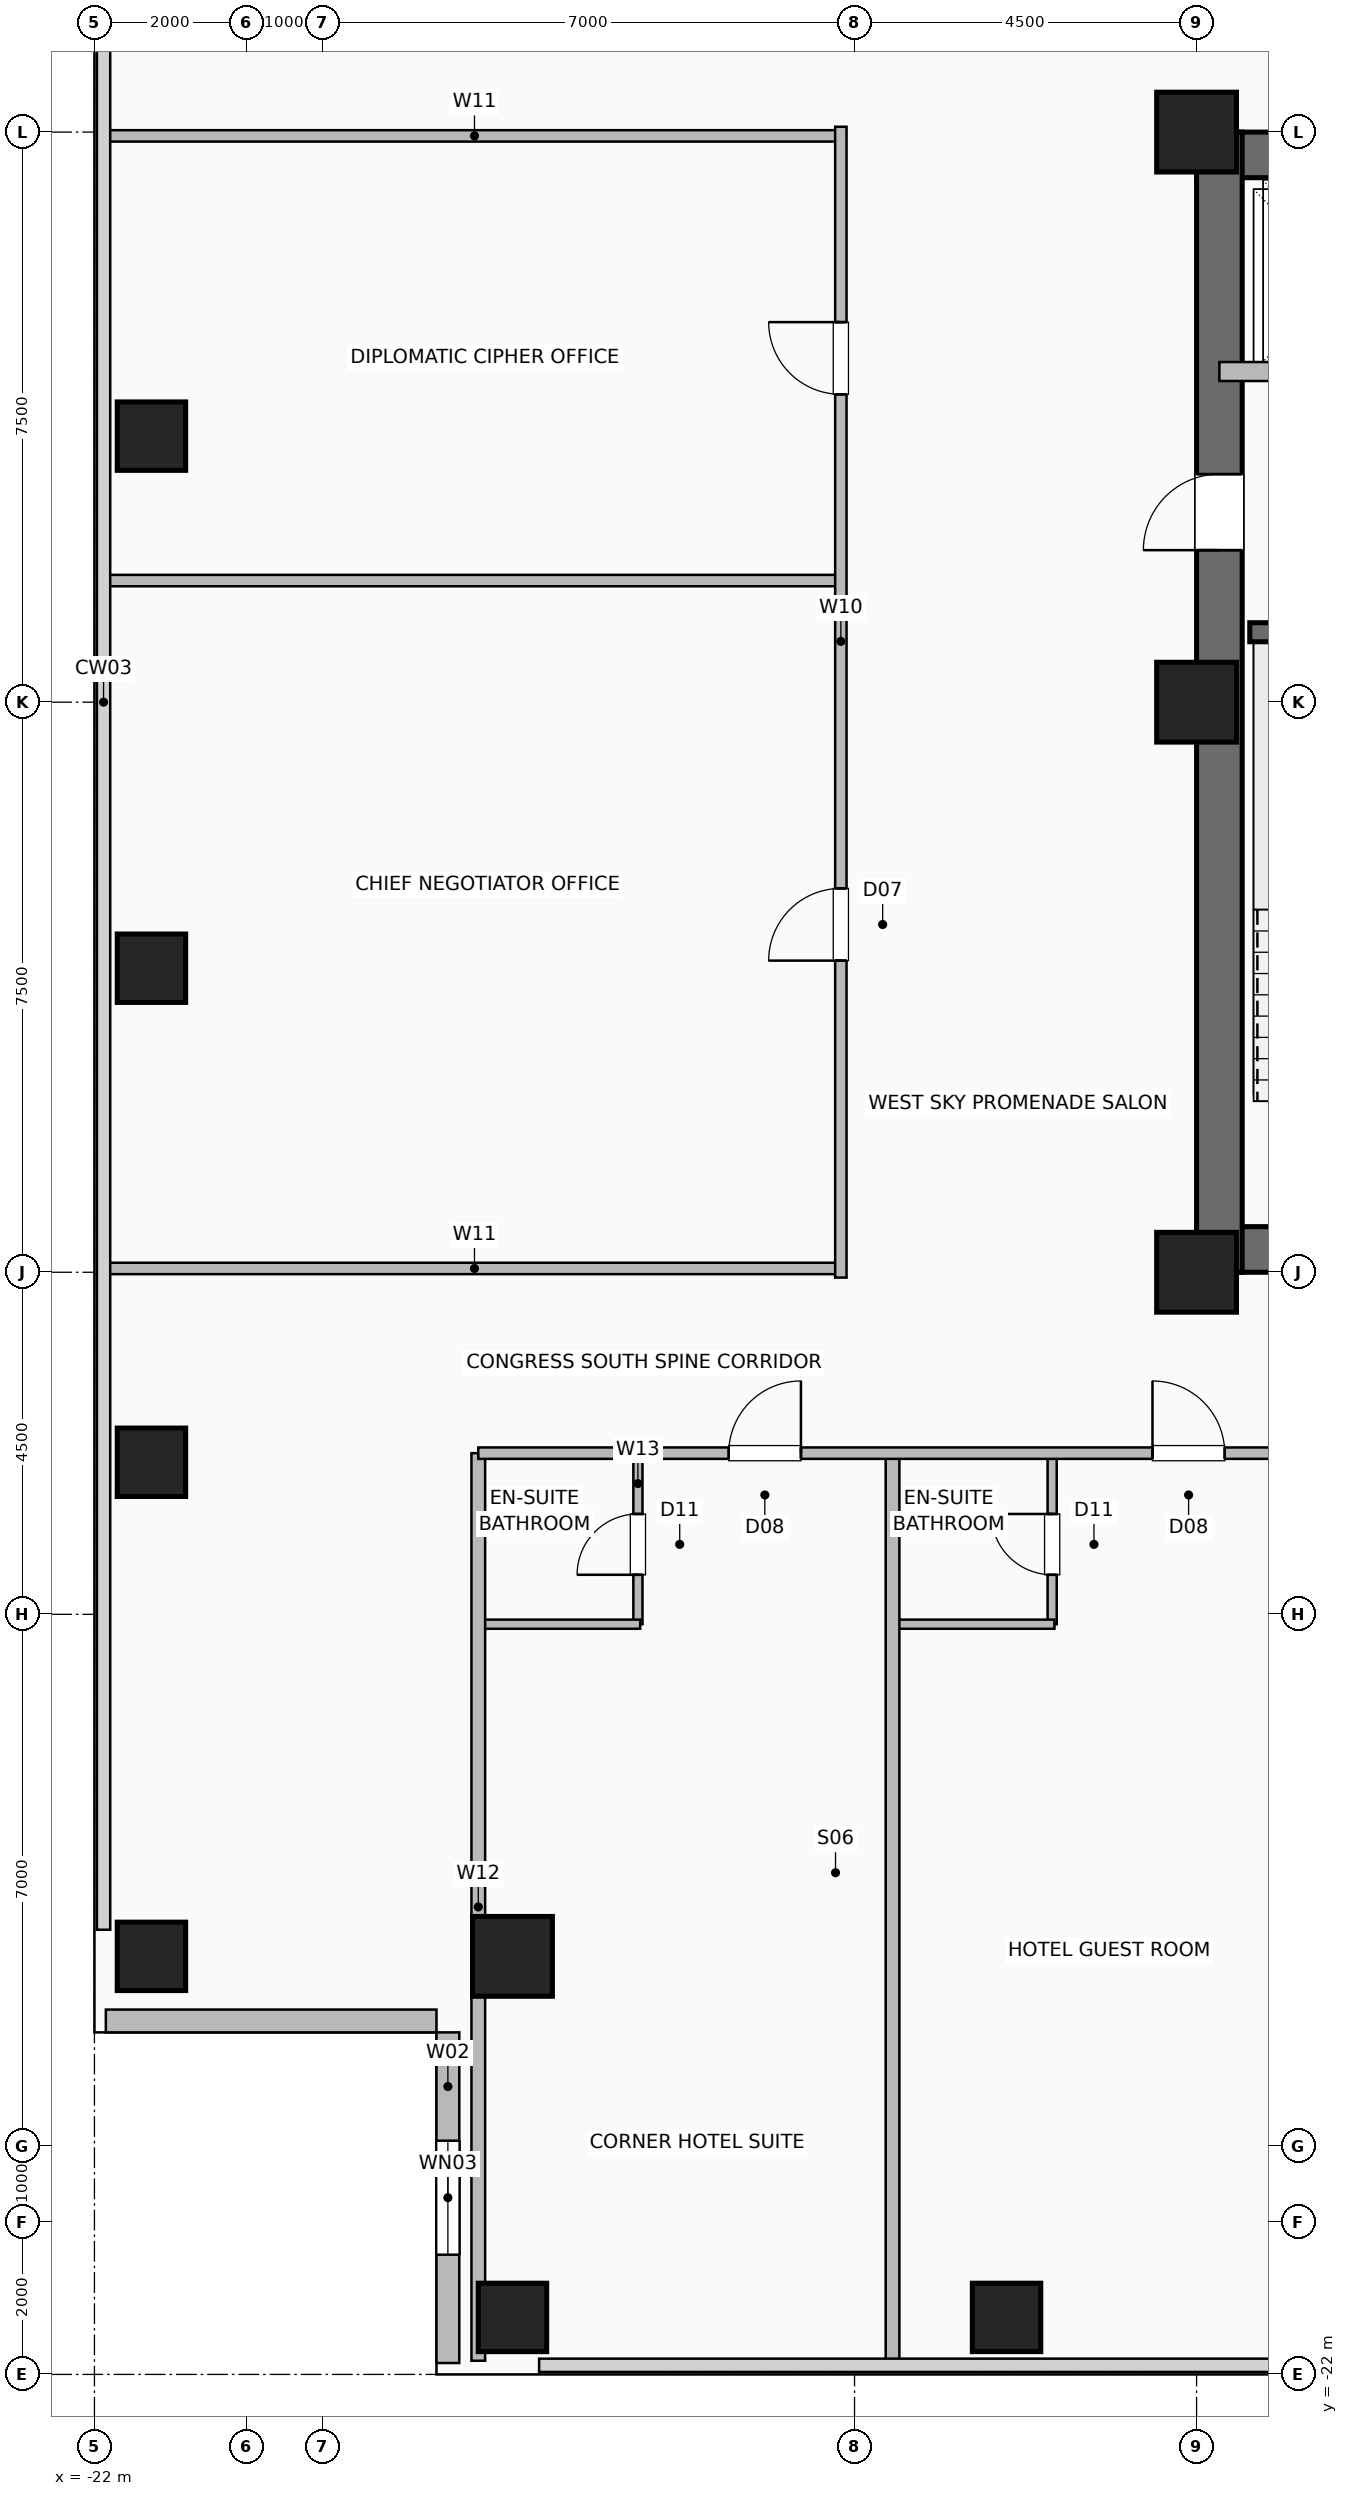
"""IFC4 building model, lengths in metres.
Left out: names, types, materials, properties, quantities, classifications, styles, units other than length and angle.
Written with IfcOpenShell. Run it as: python <this file> out.ifc"""

import sys

from ifc_helpers import new_model, si_unit, direction, frame, frame_2d, origin, origin_2d, place, context, subcontext, project, spatial, rectangle, hollow_rectangle, extrude, element, fill, save


model = new_model("IFC4")
c1 = context("Model", 3, precision=1e-05, world=origin(), true_north=direction((0.0, 1.0)))
c2 = subcontext(c1, "Body", "Model", "MODEL_VIEW")
j1 = project(units=[si_unit("LENGTHUNIT", "METRE"), si_unit("PLANEANGLEUNIT", "RADIAN")], contexts=[c1])
p1 = place(None, origin())
s1 = spatial("IfcSite", under=j1, at=p1, CompositionType="ELEMENT")
p2 = place(p1, origin())
s2 = spatial("IfcBuilding", under=s1, at=p2, CompositionType="ELEMENT")
p3 = place(p2, frame((0.0, 0.0, 151.6)))
s3 = spatial("IfcBuildingStorey", under=s2, at=p3, CompositionType="ELEMENT", Elevation=151.6)
for number, where, z_axis, x_axis in (
    (1, (-7.5, -7.5, 0.0), (0.0, 0.0, 1.0), (1.0, 0.0, 0.0)),
    (2, (-7.5, 7.5, 0.0), (0.0, 0.0, 1.0), (1.0, 0.0, 0.0)),
    (3, (-7.5, 0.0, 0.0), (0.0, 0.0, 1.0), (1.0, 0.0, 0.0)),
):
    element("IfcColumn", number, at=place(p3, frame(where, z_axis=z_axis, x_axis=x_axis)), inside=s3, PredefinedType="COLUMN", context=c2, shape_type="SweptSolid", body=[
        extrude(hollow_rectangle(XDim=1.05, YDim=1.05, WallThickness=0.05, at=origin_2d()), origin(), (0.0, 0.0, 1.0), 3.6),
    ])
for number, where, z_axis, x_axis in (
    (4, (-16.5, -21.25, 0.0), (0.0, 0.0, 1.0), (1.0, 0.0, 0.0)),
    (5, (-21.25, -16.5, 0.0), (0.0, 0.0, 1.0), (1.0, 0.0, 0.0)),
    (6, (-10.0, -21.25, 0.0), (0.0, 0.0, 1.0), (1.0, 0.0, 0.0)),
    (7, (-21.25, -10.0, 0.0), (0.0, 0.0, 1.0), (1.0, 0.0, 0.0)),
    (8, (-21.25, -3.5, 0.0), (0.0, 0.0, 1.0), (1.0, 0.0, 0.0)),
    (9, (-21.25, 3.5, 0.0), (0.0, 0.0, 1.0), (1.0, 0.0, 0.0)),
):
    element("IfcColumn", number, at=place(p3, frame(where, z_axis=z_axis, x_axis=x_axis)), inside=s3, PredefinedType="COLUMN", context=c2, shape_type="SweptSolid", body=[
        extrude(hollow_rectangle(XDim=0.9, YDim=0.9, WallThickness=0.045, at=origin_2d()), origin(), (0.0, 0.0, 1.0), 3.6),
    ])
p4 = place(p3, frame((-16.5, -16.5, 0.0), z_axis=(0.0, 0.0, 1.0), x_axis=(1.0, 0.0, 0.0)))
e10 = element("IfcColumn", 10, at=p4, inside=s3, PredefinedType="COLUMN", context=c2, shape_type="SweptSolid", body=[
    extrude(hollow_rectangle(XDim=1.05, YDim=1.05, WallThickness=0.05, at=origin_2d()), origin(), (0.0, 0.0, 1.0), 3.6),
])
p5 = place(p3, frame((-17.35, -21.85, 0.0), z_axis=(0.0, 0.0, 1.0), x_axis=(0.0, 1.0, 0.0)))
e11 = element("IfcWall", 11, at=p5, inside=s3, PredefinedType="SOLIDWALL", context=c2, shape_type="SweptSolid", body=[
    extrude(rectangle(XDim=4.35, YDim=0.3, at=frame_2d((2.175, 0.0))), origin(), (0.0, 0.0, 1.0), 3.25),
])
p6 = place(p5, frame((1.425, 0.0, 0.9)))
e12 = element("IfcOpeningElement", 12, at=p6, cuts=e11, PredefinedType="OPENING", context=c2, shape_type="SweptSolid", body=[
    extrude(rectangle(XDim=1.5, YDim=1.8, at=frame_2d((0.75, 0.9))), frame((0.0, 0.16, 0.0), z_axis=(0.0, -1.0, 0.0), x_axis=(1.0, 0.0, 0.0)), (0.0, 0.0, 1.0), 0.32),
])
p7 = place(p3, frame((-21.85, -17.35, 0.0), z_axis=(0.0, 0.0, 1.0), x_axis=(1.0, 0.0, 0.0)))
e13 = element("IfcWall", 13, at=p7, inside=s3, PredefinedType="SOLIDWALL", context=c2, shape_type="SweptSolid", body=[
    extrude(rectangle(XDim=4.35, YDim=0.3, at=frame_2d((2.175, 0.0))), origin(), (0.0, 0.0, 1.0), 3.25),
])
p8 = place(p3, frame((-7.5, -7.2, 0.0), z_axis=(0.0, 0.0, 1.0), x_axis=(1.0, 0.0, 0.0)))
e14 = element("IfcWall", 14, at=p8, inside=s3, PredefinedType="SHEAR", context=c2, shape_type="SweptSolid", body=[
    extrude(rectangle(XDim=15.0, YDim=0.6, at=frame_2d((7.5, 0.0))), origin(), (0.0, 0.0, 1.0), 3.25),
])
p9 = place(p8, frame((1.55, 0.0, 0.0)))
e15 = element("IfcOpeningElement", 15, at=p9, cuts=e14, PredefinedType="OPENING", context=c2, shape_type="SweptSolid", body=[
    extrude(rectangle(XDim=1.05, YDim=2.08, at=frame_2d((0.525, 1.04))), frame((0.0, 0.31, 0.0), z_axis=(0.0, -1.0, 0.0), x_axis=(1.0, 0.0, 0.0)), (0.0, 0.0, 1.0), 0.62),
])
p10 = place(p8, frame((12.4, 0.0, 0.0)))
e16 = element("IfcOpeningElement", 16, at=p10, cuts=e14, PredefinedType="OPENING", context=c2, shape_type="SweptSolid", body=[
    extrude(rectangle(XDim=1.05, YDim=2.08, at=frame_2d((0.525, 1.04))), frame((0.0, 0.31, 0.0), z_axis=(0.0, -1.0, 0.0), x_axis=(1.0, 0.0, 0.0)), (0.0, 0.0, 1.0), 0.62),
])
p11 = place(p8, frame((5.2, 0.0, 0.0)))
e17 = element("IfcOpeningElement", 17, at=p11, cuts=e14, PredefinedType="OPENING", context=c2, shape_type="SweptSolid", body=[
    extrude(rectangle(XDim=1.0, YDim=2.08, at=frame_2d((0.5, 1.04))), frame((0.0, 0.31, 0.0), z_axis=(0.0, -1.0, 0.0), x_axis=(1.0, 0.0, 0.0)), (0.0, 0.0, 1.0), 0.62),
])
p12 = place(p8, frame((8.65, 0.0, 0.0)))
e18 = element("IfcOpeningElement", 18, at=p12, cuts=e14, PredefinedType="OPENING", context=c2, shape_type="SweptSolid", body=[
    extrude(rectangle(XDim=1.0, YDim=2.08, at=frame_2d((0.5, 1.04))), frame((0.0, 0.31, 0.0), z_axis=(0.0, -1.0, 0.0), x_axis=(1.0, 0.0, 0.0)), (0.0, 0.0, 1.0), 0.62),
])
p13 = place(p3, frame((-7.5, 7.2, 0.0), z_axis=(0.0, 0.0, 1.0), x_axis=(1.0, 0.0, 0.0)))
e19 = element("IfcWall", 19, at=p13, inside=s3, PredefinedType="SHEAR", context=c2, shape_type="SweptSolid", body=[
    extrude(rectangle(XDim=15.0, YDim=0.6, at=frame_2d((7.5, 0.0))), origin(), (0.0, 0.0, 1.0), 3.25),
])
p14 = place(p3, frame((-7.2, -7.5, 0.0), z_axis=(0.0, 0.0, 1.0), x_axis=(0.0, 1.0, 0.0)))
e20 = element("IfcWall", 20, at=p14, inside=s3, PredefinedType="SHEAR", context=c2, shape_type="SweptSolid", body=[
    extrude(rectangle(XDim=15.0, YDim=0.6, at=frame_2d((7.5, 0.0))), origin(), (0.0, 0.0, 1.0), 3.25),
])
p15 = place(p14, frame((9.5, 0.0, 0.0)))
e21 = element("IfcOpeningElement", 21, at=p15, cuts=e20, PredefinedType="OPENING", context=c2, shape_type="SweptSolid", body=[
    extrude(rectangle(XDim=1.0, YDim=2.08, at=frame_2d((0.5, 1.04))), frame((0.0, 0.31, 0.0), z_axis=(0.0, -1.0, 0.0), x_axis=(1.0, 0.0, 0.0)), (0.0, 0.0, 1.0), 0.62),
])
p16 = place(p3, frame((-6.8, 0.92, 0.0), z_axis=(0.0, 0.0, 1.0), x_axis=(1.0, 0.0, 0.0)))
e22 = element("IfcWall", 22, at=p16, inside=s3, PredefinedType="SHEAR", context=c2, shape_type="SweptSolid", body=[
    extrude(rectangle(XDim=3.33, YDim=0.25, at=frame_2d((1.665, 0.0))), origin(), (0.0, 0.0, 1.0), 3.25),
])
p17 = place(p3, frame((-7.2, 4.35, 0.0), z_axis=(0.0, 0.0, 1.0), x_axis=(1.0, 0.0, 0.0)))
e23 = element("IfcWall", 23, at=p17, inside=s3, PredefinedType="SHEAR", context=c2, shape_type="SweptSolid", body=[
    extrude(rectangle(XDim=2.7, YDim=0.25, at=frame_2d((1.35, 0.0))), origin(), (0.0, 0.0, 1.0), 3.25),
])
p18 = place(p17, frame((0.75, 0.0, 0.0)))
e24 = element("IfcOpeningElement", 24, at=p18, cuts=e23, PredefinedType="OPENING", context=c2, shape_type="SweptSolid", body=[
    extrude(rectangle(XDim=1.2, YDim=2.2, at=frame_2d((0.6, 1.1))), frame((0.0, 0.135, 0.0), z_axis=(0.0, -1.0, 0.0), x_axis=(1.0, 0.0, 0.0)), (0.0, 0.0, 1.0), 0.27),
])
p19 = place(p3, frame((-14.85, -12.13, 0.0), z_axis=(0.0, 0.0, 1.0), x_axis=(0.0, 1.0, 0.0)))
e25 = element("IfcWall", 25, at=p19, inside=s3, PredefinedType="PLUMBINGWALL", context=c2, shape_type="SweptSolid", body=[
    extrude(rectangle(XDim=2.25, YDim=0.12, at=frame_2d((1.125, 0.0))), origin(), (0.0, 0.0, 1.0), 3.25),
])
p20 = place(p19, frame((0.65, 0.0, 0.0)))
e26 = element("IfcOpeningElement", 26, at=p20, cuts=e25, PredefinedType="OPENING", context=c2, shape_type="SweptSolid", body=[
    extrude(rectangle(XDim=0.8, YDim=2.05, at=frame_2d((0.4, 1.025))), frame((0.0, 0.07, 0.0), z_axis=(0.0, -1.0, 0.0), x_axis=(1.0, 0.0, 0.0)), (0.0, 0.0, 1.0), 0.14),
])
p21 = place(p3, frame((-16.92, -12.13, 0.0), z_axis=(0.0, 0.0, 1.0), x_axis=(1.0, 0.0, 0.0)))
e27 = element("IfcWall", 27, at=p21, inside=s3, PredefinedType="PLUMBINGWALL", context=c2, shape_type="SweptSolid", body=[
    extrude(rectangle(XDim=2.1, YDim=0.12, at=frame_2d((1.05, 0.0))), origin(), (0.0, 0.0, 1.0), 3.25),
])
p22 = place(p3, frame((-9.4, -12.13, 0.0), z_axis=(0.0, 0.0, 1.0), x_axis=(0.0, 1.0, 0.0)))
e28 = element("IfcWall", 28, at=p22, inside=s3, PredefinedType="PLUMBINGWALL", context=c2, shape_type="SweptSolid", body=[
    extrude(rectangle(XDim=2.25, YDim=0.12, at=frame_2d((1.125, 0.0))), origin(), (0.0, 0.0, 1.0), 3.25),
])
p23 = place(p22, frame((0.65, 0.0, 0.0)))
e29 = element("IfcOpeningElement", 29, at=p23, cuts=e28, PredefinedType="OPENING", context=c2, shape_type="SweptSolid", body=[
    extrude(rectangle(XDim=0.8, YDim=2.05, at=frame_2d((0.4, 1.025))), frame((0.0, 0.07, 0.0), z_axis=(0.0, -1.0, 0.0), x_axis=(1.0, 0.0, 0.0)), (0.0, 0.0, 1.0), 0.14),
])
p24 = place(p3, frame((-11.47, -12.13, 0.0), z_axis=(0.0, 0.0, 1.0), x_axis=(1.0, 0.0, 0.0)))
e30 = element("IfcWall", 30, at=p24, inside=s3, PredefinedType="PLUMBINGWALL", context=c2, shape_type="SweptSolid", body=[
    extrude(rectangle(XDim=2.1, YDim=0.12, at=frame_2d((1.05, 0.0))), origin(), (0.0, 0.0, 1.0), 3.25),
])
for number, where, z_axis, x_axis in (
    (31, (-16.95, -21.82, 0.0), (0.0, 0.0, 1.0), (0.0, 1.0, 0.0)),
    (32, (-11.5, -21.82, 0.0), (0.0, 0.0, 1.0), (0.0, 1.0, 0.0)),
):
    element("IfcWall", number, at=place(p3, frame(where, z_axis=z_axis, x_axis=x_axis)), inside=s3, PredefinedType="PARTITIONING", context=c2, shape_type="SweptSolid", body=[
        extrude(rectangle(XDim=11.94, YDim=0.18, at=frame_2d((5.97, 0.0))), origin(), (0.0, 0.0, 1.0), 3.25),
    ])
p25 = place(p3, frame((-16.95, -9.88, 0.0), z_axis=(0.0, 0.0, 1.0), x_axis=(1.0, 0.0, 0.0)))
e33 = element("IfcWall", 33, at=p25, inside=s3, PredefinedType="PARTITIONING", context=c2, shape_type="SweptSolid", body=[
    extrude(rectangle(XDim=33.9, YDim=0.15, at=frame_2d((16.95, 0.0))), origin(), (0.0, 0.0, 1.0), 3.25),
])
p26 = place(p25, frame((3.295, 0.0, 0.0)))
e34 = element("IfcOpeningElement", 34, at=p26, cuts=e33, PredefinedType="OPENING", context=c2, shape_type="SweptSolid", body=[
    extrude(rectangle(XDim=0.95, YDim=2.08, at=frame_2d((0.475, 1.04))), frame((0.0, 0.085, 0.0), z_axis=(0.0, -1.0, 0.0), x_axis=(1.0, 0.0, 0.0)), (0.0, 0.0, 1.0), 0.17),
])
p27 = place(p25, frame((8.87, 0.0, 0.0)))
e35 = element("IfcOpeningElement", 35, at=p27, cuts=e33, PredefinedType="OPENING", context=c2, shape_type="SweptSolid", body=[
    extrude(rectangle(XDim=0.95, YDim=2.08, at=frame_2d((0.475, 1.04))), frame((0.0, 0.085, 0.0), z_axis=(0.0, -1.0, 0.0), x_axis=(1.0, 0.0, 0.0)), (0.0, 0.0, 1.0), 0.17),
])
p28 = place(p25, frame((13.613, 0.0, 0.0)))
e36 = element("IfcOpeningElement", 36, at=p28, cuts=e33, PredefinedType="OPENING", context=c2, shape_type="SweptSolid", body=[
    extrude(rectangle(XDim=0.95, YDim=2.08, at=frame_2d((0.475, 1.04))), frame((0.0, 0.085, 0.0), z_axis=(0.0, -1.0, 0.0), x_axis=(1.0, 0.0, 0.0)), (0.0, 0.0, 1.0), 0.17),
])
p29 = place(p25, frame((17.468, 0.0, 0.0)))
e37 = element("IfcOpeningElement", 37, at=p29, cuts=e33, PredefinedType="OPENING", context=c2, shape_type="SweptSolid", body=[
    extrude(rectangle(XDim=0.95, YDim=2.08, at=frame_2d((0.475, 1.04))), frame((0.0, 0.085, 0.0), z_axis=(0.0, -1.0, 0.0), x_axis=(1.0, 0.0, 0.0)), (0.0, 0.0, 1.0), 0.17),
])
p30 = place(p25, frame((21.167, 0.0, 0.0)))
e38 = element("IfcOpeningElement", 38, at=p30, cuts=e33, PredefinedType="OPENING", context=c2, shape_type="SweptSolid", body=[
    extrude(rectangle(XDim=0.95, YDim=2.08, at=frame_2d((0.475, 1.04))), frame((0.0, 0.085, 0.0), z_axis=(0.0, -1.0, 0.0), x_axis=(1.0, 0.0, 0.0)), (0.0, 0.0, 1.0), 0.17),
])
p31 = place(p25, frame((26.17, 0.0, 0.0)))
e39 = element("IfcOpeningElement", 39, at=p31, cuts=e33, PredefinedType="OPENING", context=c2, shape_type="SweptSolid", body=[
    extrude(rectangle(XDim=0.95, YDim=2.08, at=frame_2d((0.475, 1.04))), frame((0.0, 0.085, 0.0), z_axis=(0.0, -1.0, 0.0), x_axis=(1.0, 0.0, 0.0)), (0.0, 0.0, 1.0), 0.17),
])
p32 = place(p25, frame((31.745, 0.0, 0.0)))
e40 = element("IfcOpeningElement", 40, at=p32, cuts=e33, PredefinedType="OPENING", context=c2, shape_type="SweptSolid", body=[
    extrude(rectangle(XDim=0.95, YDim=2.08, at=frame_2d((0.475, 1.04))), frame((0.0, 0.085, 0.0), z_axis=(0.0, -1.0, 0.0), x_axis=(1.0, 0.0, 0.0)), (0.0, 0.0, 1.0), 0.17),
])
for number, where, z_axis, x_axis in (
    (41, (-21.82, -7.45, 0.0), (0.0, 0.0, 1.0), (1.0, 0.0, 0.0)),
    (42, (-21.82, 1.6, 0.0), (0.0, 0.0, 1.0), (1.0, 0.0, 0.0)),
    (43, (-21.82, 7.45, 0.0), (0.0, 0.0, 1.0), (1.0, 0.0, 0.0)),
):
    element("IfcWall", number, at=place(p3, frame(where, z_axis=z_axis, x_axis=x_axis)), inside=s3, PredefinedType="PARTITIONING", context=c2, shape_type="SweptSolid", body=[
        extrude(rectangle(XDim=9.64, YDim=0.15, at=frame_2d((4.82, 0.0))), origin(), (0.0, 0.0, 1.0), 3.25),
    ])
p33 = place(p3, frame((-12.18, -7.57, 0.0), z_axis=(0.0, 0.0, 1.0), x_axis=(0.0, 1.0, 0.0)))
e44 = element("IfcWall", 44, at=p33, inside=s3, PredefinedType="PARTITIONING", context=c2, shape_type="SweptSolid", body=[
    extrude(rectangle(XDim=15.14, YDim=0.15, at=frame_2d((7.57, 0.0))), origin(), (0.0, 0.0, 1.0), 3.25),
])
p34 = place(p33, frame((4.17, 0.0, 0.0)))
e45 = element("IfcOpeningElement", 45, at=p34, cuts=e44, PredefinedType="OPENING", context=c2, shape_type="SweptSolid", body=[
    extrude(rectangle(XDim=0.95, YDim=2.06, at=frame_2d((0.475, 1.03))), frame((0.0, 0.085, 0.0), z_axis=(0.0, -1.0, 0.0), x_axis=(1.0, 0.0, 0.0)), (0.0, 0.0, 1.0), 0.17),
])
p35 = place(p33, frame((11.62, 0.0, 0.0)))
e46 = element("IfcOpeningElement", 46, at=p35, cuts=e44, PredefinedType="OPENING", context=c2, shape_type="SweptSolid", body=[
    extrude(rectangle(XDim=0.95, YDim=2.06, at=frame_2d((0.475, 1.03))), frame((0.0, 0.085, 0.0), z_axis=(0.0, -1.0, 0.0), x_axis=(1.0, 0.0, 0.0)), (0.0, 0.0, 1.0), 0.17),
])
p36 = place(p6, origin())
e47 = element("IfcWindow", 47, at=p36, inside=s3, PartitioningType="SINGLE_PANEL", PredefinedType="WINDOW", context=c2, shape_type="SweptSolid", body=[
    extrude(rectangle(XDim=1.5, YDim=1.8, at=frame_2d((0.75, 0.9))), frame((0.0, 0.03, 0.0), z_axis=(0.0, -1.0, 0.0), x_axis=(1.0, 0.0, 0.0)), (0.0, 0.0, 1.0), 0.06),
])
fill(e12, e47)
p37 = place(p15, origin())
e48 = element("IfcDoor", 48, at=p37, inside=s3, OperationType="SINGLE_SWING_LEFT", PredefinedType="DOOR", context=c2, shape_type="SweptSolid", body=[
    extrude(rectangle(XDim=1.0, YDim=2.08, at=frame_2d((0.5, 1.04))), frame((0.0, 0.025, 0.0), z_axis=(0.0, -1.0, 0.0), x_axis=(1.0, 0.0, 0.0)), (0.0, 0.0, 1.0), 0.05),
])
fill(e21, e48)
p38 = place(p20, origin())
e49 = element("IfcDoor", 49, at=p38, inside=s3, OperationType="SINGLE_SWING_LEFT", PredefinedType="DOOR", context=c2, shape_type="SweptSolid", body=[
    extrude(rectangle(XDim=0.8, YDim=2.05, at=frame_2d((0.4, 1.025))), frame((0.0, 0.025, 0.0), z_axis=(0.0, -1.0, 0.0), x_axis=(1.0, 0.0, 0.0)), (0.0, 0.0, 1.0), 0.05),
])
fill(e26, e49)
p39 = place(p23, origin())
e50 = element("IfcDoor", 50, at=p39, inside=s3, OperationType="SINGLE_SWING_RIGHT", PredefinedType="DOOR", context=c2, shape_type="SweptSolid", body=[
    extrude(rectangle(XDim=0.8, YDim=2.05, at=frame_2d((0.4, 1.025))), frame((0.0, 0.025, 0.0), z_axis=(0.0, -1.0, 0.0), x_axis=(1.0, 0.0, 0.0)), (0.0, 0.0, 1.0), 0.05),
])
fill(e29, e50)
p40 = place(p26, origin())
e51 = element("IfcDoor", 51, at=p40, inside=s3, OperationType="SINGLE_SWING_RIGHT", PredefinedType="DOOR", context=c2, shape_type="SweptSolid", body=[
    extrude(rectangle(XDim=0.95, YDim=2.08, at=frame_2d((0.475, 1.04))), frame((0.0, 0.025, 0.0), z_axis=(0.0, -1.0, 0.0), x_axis=(1.0, 0.0, 0.0)), (0.0, 0.0, 1.0), 0.05),
])
fill(e34, e51)
p41 = place(p27, origin())
e52 = element("IfcDoor", 52, at=p41, inside=s3, OperationType="SINGLE_SWING_LEFT", PredefinedType="DOOR", context=c2, shape_type="SweptSolid", body=[
    extrude(rectangle(XDim=0.95, YDim=2.08, at=frame_2d((0.475, 1.04))), frame((0.0, 0.025, 0.0), z_axis=(0.0, -1.0, 0.0), x_axis=(1.0, 0.0, 0.0)), (0.0, 0.0, 1.0), 0.05),
])
fill(e35, e52)
p42 = place(p34, origin())
e53 = element("IfcDoor", 53, at=p42, inside=s3, OperationType="SINGLE_SWING_LEFT", PredefinedType="DOOR", context=c2, shape_type="SweptSolid", body=[
    extrude(rectangle(XDim=0.95, YDim=2.06, at=frame_2d((0.475, 1.03))), frame((0.0, 0.025, 0.0), z_axis=(0.0, -1.0, 0.0), x_axis=(1.0, 0.0, 0.0)), (0.0, 0.0, 1.0), 0.05),
])
fill(e45, e53)
p43 = place(p35, origin())
e54 = element("IfcDoor", 54, at=p43, inside=s3, OperationType="SINGLE_SWING_RIGHT", PredefinedType="DOOR", context=c2, shape_type="SweptSolid", body=[
    extrude(rectangle(XDim=0.95, YDim=2.06, at=frame_2d((0.475, 1.03))), frame((0.0, 0.025, 0.0), z_axis=(0.0, -1.0, 0.0), x_axis=(1.0, 0.0, 0.0)), (0.0, 0.0, 1.0), 0.05),
])
fill(e46, e54)
save(model, sys.argv[1])
